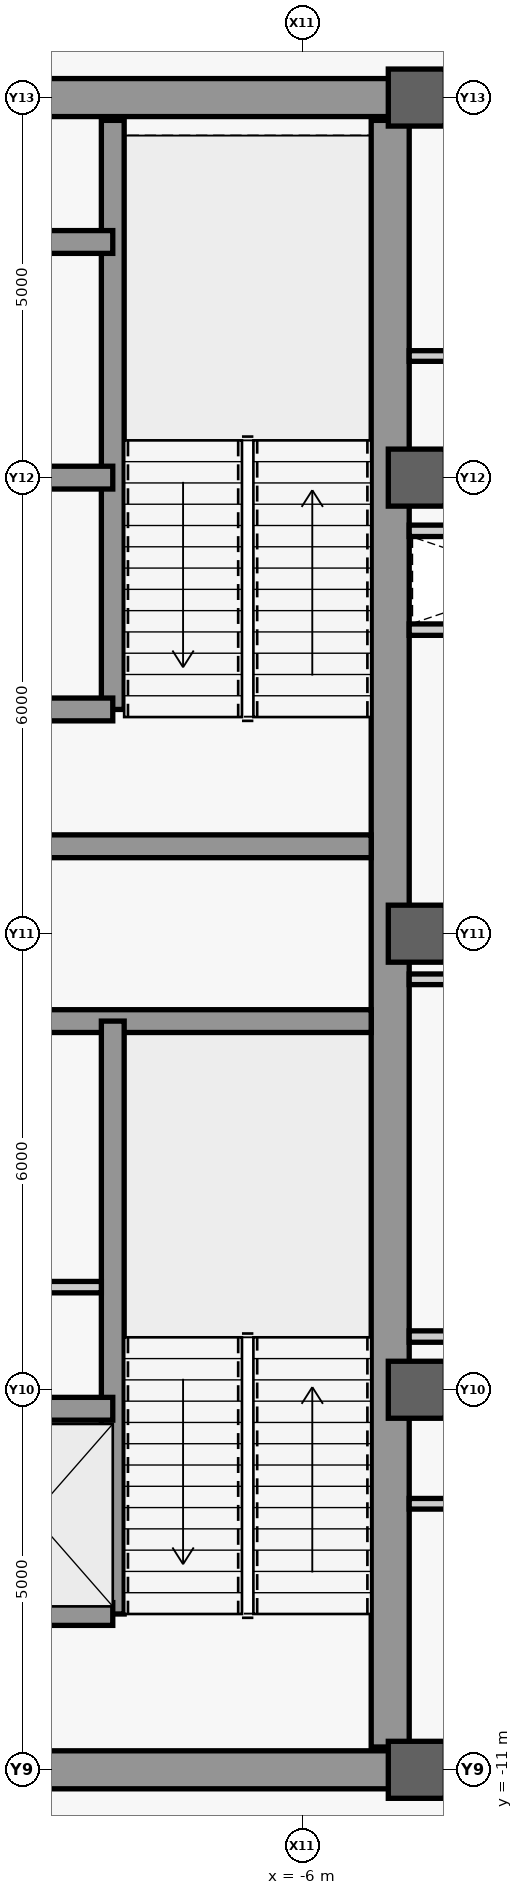
"""IFC4 building model, lengths in metres.
Left out: names, types, materials, properties, quantities, classifications, styles, units other than length and angle.
Written with IfcOpenShell. Run it as: python <this file> out.ifc"""

import sys

from ifc_helpers import new_model, si_unit, direction, frame, frame_2d, origin, origin_2d, place, context, subcontext, project, spatial, rectangle, extrude, source, transform, mapped, element, save


model = new_model("IFC4")
c1 = context("Model", 3, precision=1e-05, world=origin(), true_north=direction((0.0, 1.0)))
c2 = subcontext(c1, "Body", "Model", "MODEL_VIEW")
j1 = project(units=[si_unit("LENGTHUNIT", "METRE"), si_unit("PLANEANGLEUNIT", "RADIAN")], contexts=[c1])
p1 = place(None, origin())
s1 = spatial("IfcSite", under=j1, at=p1, CompositionType="ELEMENT")
p2 = place(p1, origin())
s2 = spatial("IfcBuilding", under=s1, at=p2, CompositionType="ELEMENT")
p3 = place(p2, frame((0.0, 0.0, 380.3)))
s3 = spatial("IfcBuildingStorey", under=s2, at=p3, CompositionType="ELEMENT", Elevation=380.3)
m1 = source(origin(), c2, "Body", "SweptSolid", [
    extrude(rectangle(XDim=21.4, YDim=0.5, at=frame_2d((10.7, 0.0))), origin(), (0.0, 0.0, 1.0), 4.45),
])
p4 = place(p3, frame((-4.85, -10.7, 0.0), z_axis=(0.0, 0.0, 1.0), x_axis=(0.0, 1.0, 0.0)))
e1 = element("IfcWall", 1, at=p4, inside=s3, PredefinedType="SHEAR", context=c2, shape_type="MappedRepresentation", body=[
    mapped(m1, transform((0.0, 0.0, 0.0), scale=1.0)),
])
m2 = source(origin(), c2, "Body", "SweptSolid", [
    extrude(rectangle(XDim=5.9, YDim=0.5, at=frame_2d((2.95, 0.0))), origin(), (0.0, 0.0, 1.0), 4.45),
])
for number, where, z_axis, x_axis in (
    (2, (-10.75, -11.0, 0.0), (0.0, 0.0, 1.0), (1.0, 0.0, 0.0)),
    (3, (-10.75, 11.0, 0.0), (0.0, 0.0, 1.0), (1.0, 0.0, 0.0)),
):
    element("IfcWall", number, at=place(p3, frame(where, z_axis=z_axis, x_axis=x_axis)), inside=s3, PredefinedType="SHEAR", context=c2, shape_type="MappedRepresentation", body=[
        mapped(m2, transform((0.0, 0.0, 0.0), scale=1.0)),
    ])
m3 = source(origin(), c2, "Body", "SweptSolid", [
    extrude(rectangle(XDim=5.65, YDim=0.3, at=frame_2d((2.825, 0.0))), origin(), (0.0, 0.0, 1.0), 4.45),
])
for number, where, z_axis, x_axis in (
    (4, (-10.75, -1.15, 0.0), (0.0, 0.0, 1.0), (1.0, 0.0, 0.0)),
    (5, (-10.75, 1.15, 0.0), (0.0, 0.0, 1.0), (1.0, 0.0, 0.0)),
):
    element("IfcWall", number, at=place(p3, frame(where, z_axis=z_axis, x_axis=x_axis)), inside=s3, PredefinedType="SHEAR", context=c2, shape_type="MappedRepresentation", body=[
        mapped(m3, transform((0.0, 0.0, 0.0), scale=1.0)),
    ])
m4 = source(origin(), c2, "Body", "SweptSolid", [
    extrude(rectangle(XDim=9.2, YDim=0.5, at=frame_2d((4.6, 0.0))), origin(), (0.0, 0.0, 1.0), 4.45),
])
p5 = place(p3, frame((-4.6, -11.0, 0.0), z_axis=(0.0, 0.0, 1.0), x_axis=(1.0, 0.0, 0.0)))
e6 = element("IfcWall", 6, at=p5, inside=s3, PredefinedType="SHEAR", context=c2, shape_type="MappedRepresentation", body=[
    mapped(m4, transform((0.0, 0.0, 0.0), scale=1.0)),
])
m5 = source(origin(), c2, "Body", "SweptSolid", [
    extrude(rectangle(XDim=1.8, YDim=2.25, at=frame_2d((0.9, 1.125))), frame((0.0, 0.26, 0.0), z_axis=(0.0, -1.0, 0.0), x_axis=(1.0, 0.0, 0.0)), (0.0, 0.0, 1.0), 0.52),
])
p6 = place(p5, frame((3.7, 0.0, 0.0)))
e7 = element("IfcOpeningElement", 7, at=p6, cuts=e6, PredefinedType="OPENING", context=c2, shape_type="MappedRepresentation", body=[
    mapped(m5, transform((0.0, 0.0, 0.0), scale=1.0)),
])
p7 = place(p3, frame((-4.6, 11.0, 0.0), z_axis=(0.0, 0.0, 1.0), x_axis=(1.0, 0.0, 0.0)))
e8 = element("IfcWall", 8, at=p7, inside=s3, PredefinedType="SHEAR", context=c2, shape_type="MappedRepresentation", body=[
    mapped(m4, transform((0.0, 0.0, 0.0), scale=1.0)),
])
p8 = place(p7, frame((3.7, 0.0, 0.0)))
e9 = element("IfcOpeningElement", 9, at=p8, cuts=e8, PredefinedType="OPENING", context=c2, shape_type="MappedRepresentation", body=[
    mapped(m5, transform((0.0, 0.0, 0.0), scale=1.0)),
])
m6 = source(origin(), c2, "Body", "SweptSolid", [
    extrude(rectangle(XDim=0.75, YDim=0.75, at=origin_2d()), origin(), (0.0, 0.0, 1.0), 4.8),
])
for number, where, z_axis, x_axis in (
    (10, (-4.5, -11.0, 0.0), (0.0, 0.0, 1.0), (1.0, 0.0, 0.0)),
    (11, (-4.5, -6.0, 0.0), (0.0, 0.0, 1.0), (1.0, 0.0, 0.0)),
    (12, (-4.5, 0.0, 0.0), (0.0, 0.0, 1.0), (1.0, 0.0, 0.0)),
    (13, (-4.5, 6.0, 0.0), (0.0, 0.0, 1.0), (1.0, 0.0, 0.0)),
    (14, (-4.5, 11.0, 0.0), (0.0, 0.0, 1.0), (1.0, 0.0, 0.0)),
):
    element("IfcColumn", number, at=place(p3, frame(where, z_axis=z_axis, x_axis=x_axis)), inside=s3, PredefinedType="COLUMN", context=c2, shape_type="MappedRepresentation", body=[
        mapped(m6, transform((0.0, 0.0, 0.0), scale=1.0)),
    ])
m7 = source(origin(), c2, "Body", "SweptSolid", [
    extrude(rectangle(XDim=7.8, YDim=0.3, at=frame_2d((3.9, 0.0))), origin(), (0.0, 0.0, 1.0), 4.45),
])
p9 = place(p3, frame((-8.5, -8.95, 0.0), z_axis=(0.0, 0.0, 1.0), x_axis=(0.0, 1.0, 0.0)))
e15 = element("IfcWall", 15, at=p9, inside=s3, PredefinedType="SHEAR", context=c2, shape_type="MappedRepresentation", body=[
    mapped(m7, transform((0.0, 0.0, 0.0), scale=1.0)),
])
m8 = source(origin(), c2, "Body", "SweptSolid", [
    extrude(rectangle(XDim=2.2, YDim=0.3, at=frame_2d((1.1, 0.0))), origin(), (0.0, 0.0, 1.0), 4.45),
])
for number, where, z_axis, x_axis in (
    (16, (-10.7, -8.95, 0.0), (0.0, 0.0, 1.0), (1.0, 0.0, 0.0)),
    (17, (-10.7, -6.25, 0.0), (0.0, 0.0, 1.0), (1.0, 0.0, 0.0)),
):
    element("IfcWall", number, at=place(p3, frame(where, z_axis=z_axis, x_axis=x_axis)), inside=s3, PredefinedType="SHEAR", context=c2, shape_type="MappedRepresentation", body=[
        mapped(m8, transform((0.0, 0.0, 0.0), scale=1.0)),
    ])
m9 = source(origin(), c2, "Body", "SweptSolid", [
    extrude(rectangle(XDim=7.75, YDim=0.3, at=frame_2d((3.875, 0.0))), origin(), (0.0, 0.0, 1.0), 4.45),
])
p10 = place(p3, frame((-8.5, 2.95, 0.0), z_axis=(0.0, 0.0, 1.0), x_axis=(0.0, 1.0, 0.0)))
e18 = element("IfcWall", 18, at=p10, inside=s3, PredefinedType="SHEAR", context=c2, shape_type="MappedRepresentation", body=[
    mapped(m9, transform((0.0, 0.0, 0.0), scale=1.0)),
])
for number, where, z_axis, x_axis in (
    (19, (-10.7, 2.95, 0.0), (0.0, 0.0, 1.0), (1.0, 0.0, 0.0)),
    (20, (-10.7, 6.0, 0.0), (0.0, 0.0, 1.0), (1.0, 0.0, 0.0)),
    (21, (-10.7, 9.1, 0.0), (0.0, 0.0, 1.0), (1.0, 0.0, 0.0)),
):
    element("IfcWall", number, at=place(p3, frame(where, z_axis=z_axis, x_axis=x_axis)), inside=s3, PredefinedType="SHEAR", context=c2, shape_type="MappedRepresentation", body=[
        mapped(m8, transform((0.0, 0.0, 0.0), scale=1.0)),
    ])
m10 = source(origin(), c2, "Body", "SweptSolid", [
    extrude(rectangle(XDim=2.05, YDim=0.15, at=frame_2d((1.025, 0.0))), origin(), (0.0, 0.0, 1.0), 4.45),
])
p11 = place(p3, frame((-10.7, -4.65, 0.0), z_axis=(0.0, 0.0, 1.0), x_axis=(1.0, 0.0, 0.0)))
e22 = element("IfcWall", 22, at=p11, inside=s3, PredefinedType="PARTITIONING", context=c2, shape_type="MappedRepresentation", body=[
    mapped(m10, transform((0.0, 0.0, 0.0), scale=1.0)),
])
m11 = source(origin(), c2, "Body", "SweptSolid", [
    extrude(rectangle(XDim=3.45, YDim=0.15, at=frame_2d((1.725, 0.0))), origin(), (0.0, 0.0, 1.0), 4.45),
])
p12 = place(p3, frame((-4.6, 4.0, 0.0), z_axis=(0.0, 0.0, 1.0), x_axis=(1.0, 0.0, 0.0)))
e23 = element("IfcWall", 23, at=p12, inside=s3, PredefinedType="PARTITIONING", context=c2, shape_type="MappedRepresentation", body=[
    mapped(m11, transform((0.0, 0.0, 0.0), scale=1.0)),
])
m12 = source(origin(), c2, "Body", "SweptSolid", [
    extrude(rectangle(XDim=3.45, YDim=0.14, at=frame_2d((1.725, 0.0))), origin(), (0.0, 0.0, 1.0), 4.45),
])
p13 = place(p3, frame((-4.6, -7.5, 0.0), z_axis=(0.0, 0.0, 1.0), x_axis=(1.0, 0.0, 0.0)))
e24 = element("IfcWall", 24, at=p13, inside=s3, PredefinedType="PARTITIONING", context=c2, shape_type="MappedRepresentation", body=[
    mapped(m12, transform((0.0, 0.0, 0.0), scale=1.0)),
])
p14 = place(p3, frame((-4.6, -5.3, 0.0), z_axis=(0.0, 0.0, 1.0), x_axis=(1.0, 0.0, 0.0)))
e25 = element("IfcWall", 25, at=p14, inside=s3, PredefinedType="PARTITIONING", context=c2, shape_type="MappedRepresentation", body=[
    mapped(m11, transform((0.0, 0.0, 0.0), scale=1.0)),
])
p15 = place(p3, frame((-4.6, 7.6, 0.0), z_axis=(0.0, 0.0, 1.0), x_axis=(1.0, 0.0, 0.0)))
e26 = element("IfcWall", 26, at=p15, inside=s3, PredefinedType="PARTITIONING", context=c2, shape_type="MappedRepresentation", body=[
    mapped(m12, transform((0.0, 0.0, 0.0), scale=1.0)),
])
p16 = place(p3, frame((-4.6, 5.3, 0.0), z_axis=(0.0, 0.0, 1.0), x_axis=(1.0, 0.0, 0.0)))
e27 = element("IfcWall", 27, at=p16, inside=s3, PredefinedType="PARTITIONING", context=c2, shape_type="MappedRepresentation", body=[
    mapped(m11, transform((0.0, 0.0, 0.0), scale=1.0)),
])
p17 = place(p3, frame((-4.6, -0.6, 0.0), z_axis=(0.0, 0.0, 1.0), x_axis=(1.0, 0.0, 0.0)))
e28 = element("IfcWall", 28, at=p17, inside=s3, PredefinedType="PARTITIONING", context=c2, shape_type="MappedRepresentation", body=[
    mapped(m12, transform((0.0, 0.0, 0.0), scale=1.0)),
])
save(model, sys.argv[1])
